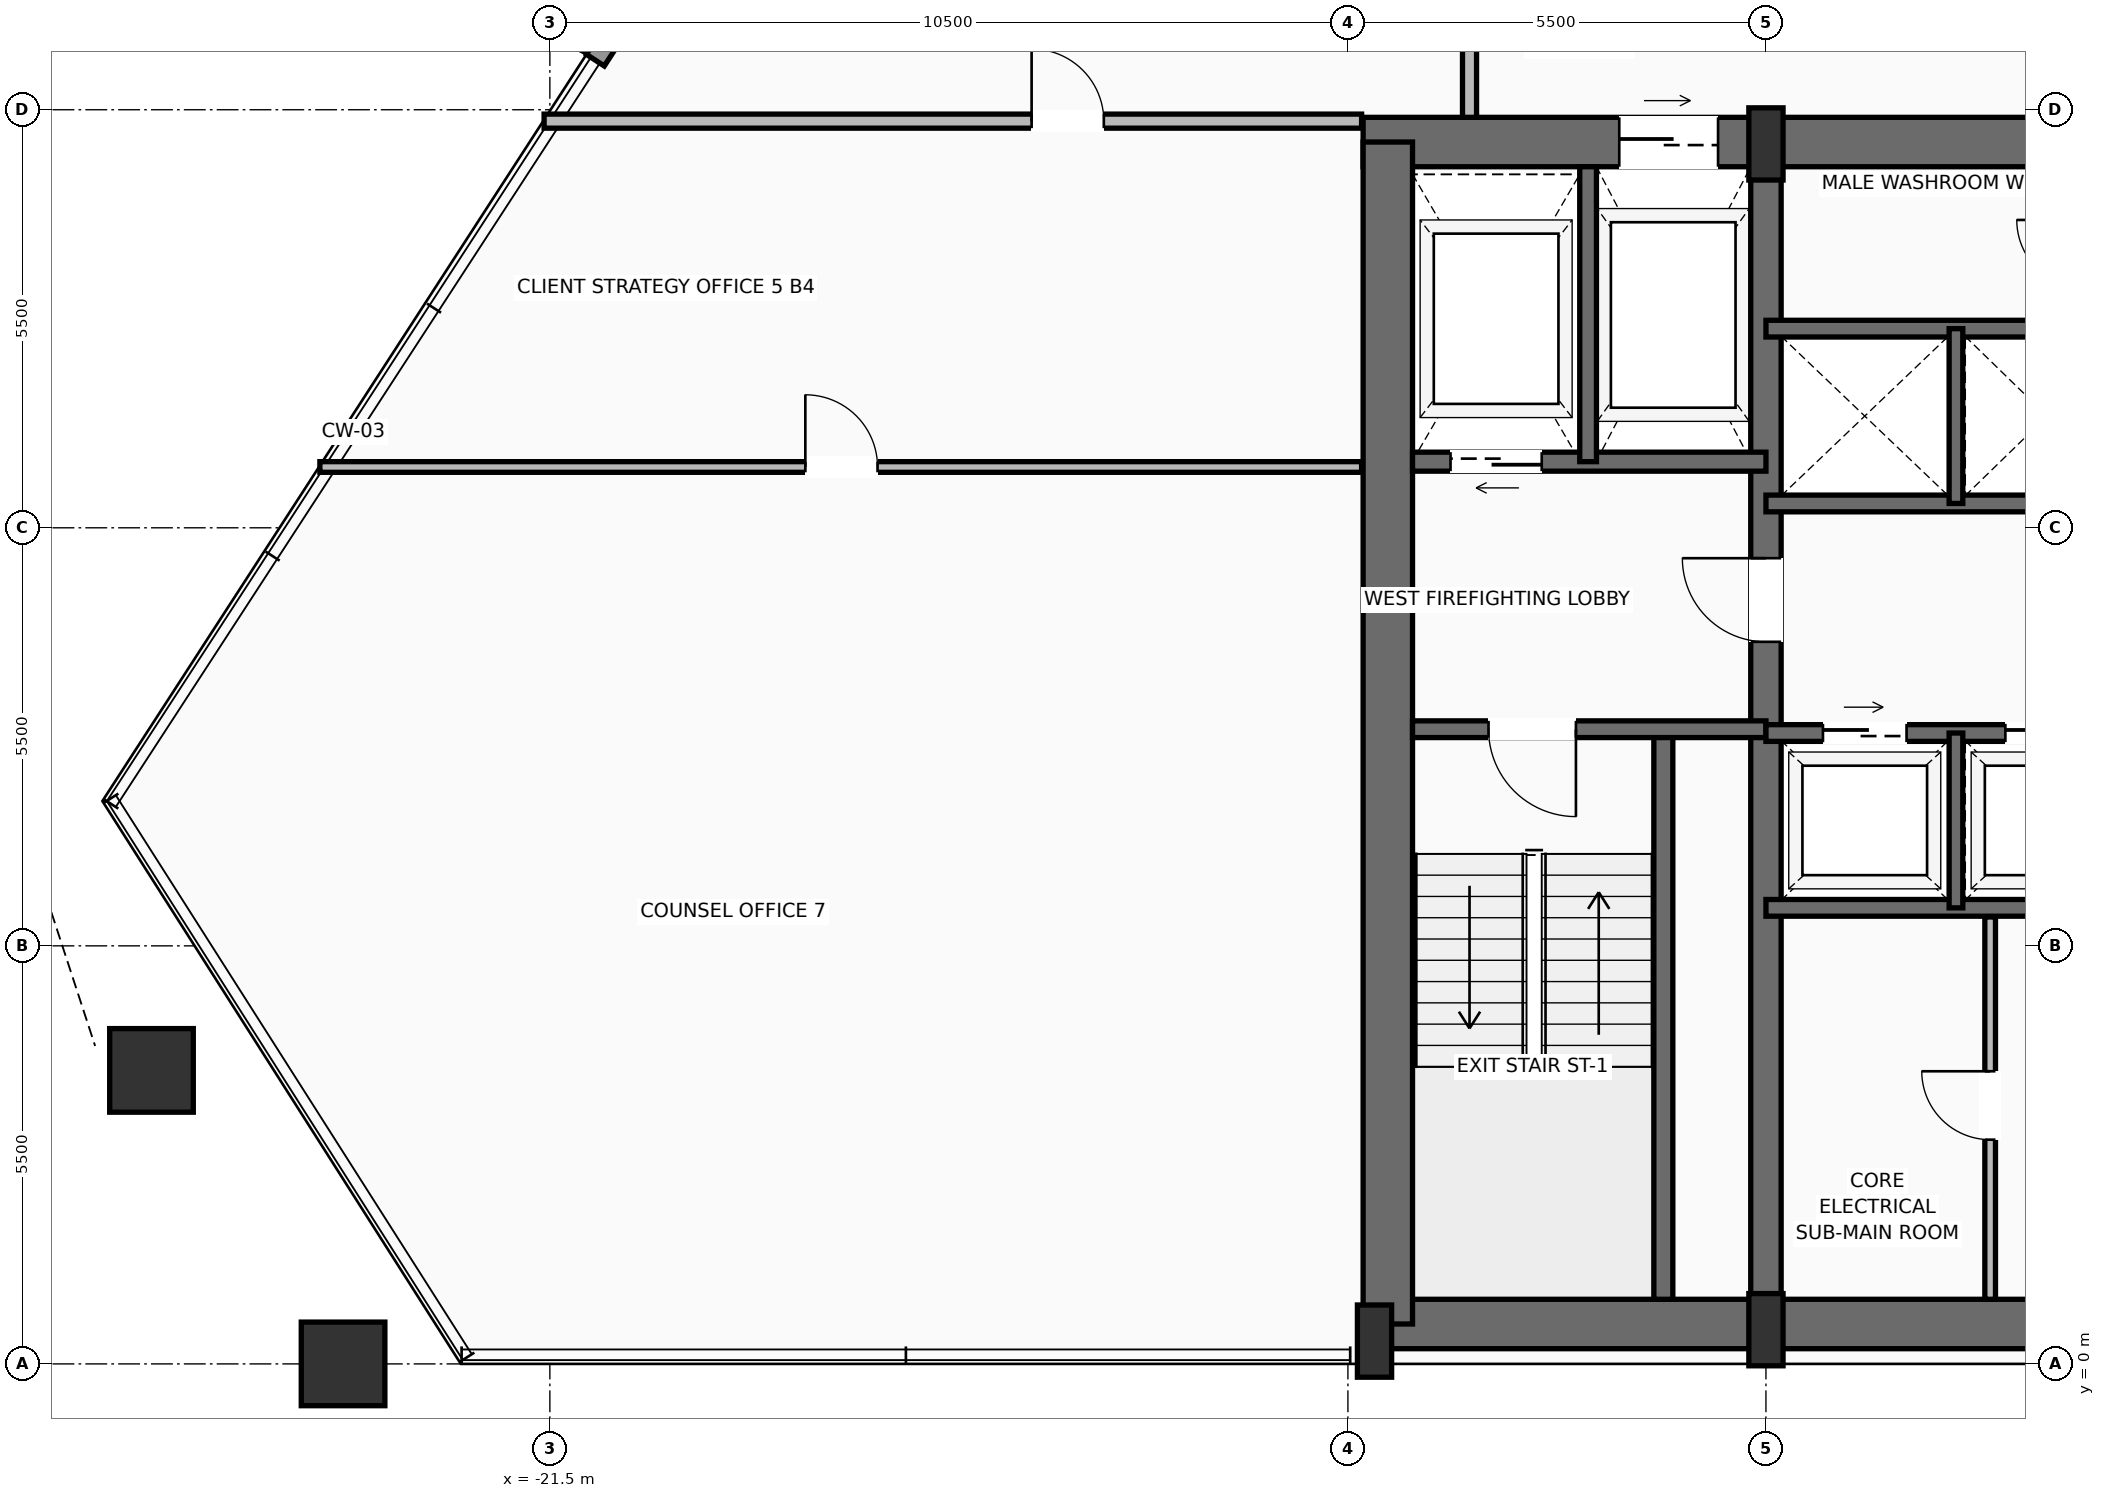
"""IFC4 building model, lengths in metres.
Left out: names, types, materials, properties, quantities, classifications, styles, units other than length and angle.
Written with IfcOpenShell. Run it as: python <this file> out.ifc"""

import sys

from ifc_helpers import new_model, si_unit, direction, frame, frame_2d, origin, origin_2d, place, context, subcontext, project, spatial, rectangle, hollow_rectangle, extrude, source, transform, mapped, element, fill, save


model = new_model("IFC4")
c1 = context("Model", 3, precision=1e-05, world=origin(), true_north=direction((0.0, 1.0)))
c2 = subcontext(c1, "Body", "Model", "MODEL_VIEW")
j1 = project(units=[si_unit("LENGTHUNIT", "METRE"), si_unit("PLANEANGLEUNIT", "RADIAN")], contexts=[c1])
p1 = place(None, origin())
s1 = spatial("IfcSite", under=j1, at=p1, CompositionType="ELEMENT")
p2 = place(p1, origin())
s2 = spatial("IfcBuilding", under=s1, at=p2, CompositionType="ELEMENT")
p3 = place(p2, frame((0.0, 0.0, 144.1)))
s3 = spatial("IfcBuildingStorey", under=s2, at=p3, CompositionType="ELEMENT", Elevation=144.1)
p4 = place(p3, frame((-10.65, 0.525, 0.0), z_axis=(0.0, 0.0, 1.0), x_axis=(1.0, 0.0, 0.0)))
e1 = element("IfcWall", 1, at=p4, inside=s3, PredefinedType="SHEAR", context=c2, shape_type="SweptSolid", body=[
    extrude(rectangle(XDim=21.3, YDim=0.65, at=frame_2d((10.65, 0.0))), origin(), (0.0, 0.0, 1.0), 3.47),
])
p5 = place(p3, frame((-10.8, 16.075, 0.0), z_axis=(0.0, 0.0, 1.0), x_axis=(1.0, 0.0, 0.0)))
e2 = element("IfcWall", 2, at=p5, inside=s3, PredefinedType="SHEAR", context=c2, shape_type="SweptSolid", body=[
    extrude(rectangle(XDim=21.6, YDim=0.65, at=frame_2d((10.8, 0.0))), origin(), (0.0, 0.0, 1.0), 3.47),
])
p6 = place(p5, frame((3.37, 0.0, 0.0)))
e3 = element("IfcOpeningElement", 3, at=p6, cuts=e2, PredefinedType="OPENING", context=c2, shape_type="SweptSolid", body=[
    extrude(rectangle(XDim=1.3, YDim=2.3, at=frame_2d((0.65, 1.15))), frame((0.0, 0.335, 0.0), z_axis=(0.0, -1.0, 0.0), x_axis=(1.0, 0.0, 0.0)), (0.0, 0.0, 1.0), 0.67),
])
p7 = place(p5, frame((9.8, 0.0, 0.0)))
e4 = element("IfcOpeningElement", 4, at=p7, cuts=e2, PredefinedType="OPENING", context=c2, shape_type="SweptSolid", body=[
    extrude(rectangle(XDim=2.0, YDim=2.4, at=frame_2d((1.0, 1.2))), frame((0.0, 0.335, 0.0), z_axis=(0.0, -1.0, 0.0), x_axis=(1.0, 0.0, 0.0)), (0.0, 0.0, 1.0), 0.67),
])
p8 = place(p3, frame((-10.475, 0.525, 0.0), z_axis=(0.0, 0.0, 1.0), x_axis=(0.0, 1.0, 0.0)))
e5 = element("IfcWall", 5, at=p8, inside=s3, PredefinedType="SHEAR", context=c2, shape_type="SweptSolid", body=[
    extrude(rectangle(XDim=15.55, YDim=0.65, at=frame_2d((7.775, 0.0))), origin(), (0.0, 0.0, 1.0), 3.47),
])
p9 = place(p3, frame((-5.5, 0.525, 0.0), z_axis=(0.0, 0.0, 1.0), x_axis=(0.0, 1.0, 0.0)))
e6 = element("IfcWall", 6, at=p9, inside=s3, PredefinedType="SHEAR", context=c2, shape_type="SweptSolid", body=[
    extrude(rectangle(XDim=15.55, YDim=0.4, at=frame_2d((7.775, 0.0))), origin(), (0.0, 0.0, 1.0), 3.47),
])
p10 = place(p9, frame((8.975, 0.0, 0.0)))
e7 = element("IfcOpeningElement", 7, at=p10, cuts=e6, PredefinedType="OPENING", context=c2, shape_type="SweptSolid", body=[
    extrude(rectangle(XDim=1.1, YDim=2.2, at=frame_2d((0.55, 1.1))), frame((0.0, 0.21, 0.0), z_axis=(0.0, -1.0, 0.0), x_axis=(1.0, 0.0, 0.0)), (0.0, 0.0, 1.0), 0.42),
])
m1 = source(origin(), c2, "Body", "SweptSolid", [
    extrude(rectangle(XDim=0.45, YDim=0.95, at=origin_2d()), origin(), (0.0, 0.0, 1.0), 3.7),
])
for number, where, z_axis, x_axis in (
    (8, (-10.65, 0.3, 0.0), (0.0, 0.0, 1.0), (1.0, 0.0, 0.0)),
    (9, (-5.5, 0.45, 0.0), (0.0, 0.0, 1.0), (1.0, 0.0, 0.0)),
    (10, (-5.5, 16.05, 0.0), (0.0, 0.0, 1.0), (1.0, 0.0, 0.0)),
):
    element("IfcColumn", number, at=place(p3, frame(where, z_axis=z_axis, x_axis=x_axis)), inside=s3, PredefinedType="PILASTER", context=c2, shape_type="MappedRepresentation", body=[
        mapped(m1, transform((0.0, 0.0, 0.0), scale=1.0)),
    ])
m2 = source(origin(), c2, "Body", "SweptSolid", [
    extrude(hollow_rectangle(XDim=1.1, YDim=1.1, WallThickness=0.055, at=origin_2d()), origin(), (0.0, 0.0, 1.0), 3.691),
])
p11 = place(p3, frame((-24.221, 0.0, 0.004), z_axis=(-0.010515987048, 0.0, 0.999944705479), x_axis=(0.0, -1.0, 0.0)))
e11 = element("IfcColumn", 11, at=p11, inside=s3, PredefinedType="COLUMN", context=c2, shape_type="MappedRepresentation", body=[
    mapped(m2, transform((0.0, 0.0, 0.0), scale=1.0)),
])
m3 = source(origin(), c2, "Body", "SweptSolid", [
    extrude(hollow_rectangle(XDim=1.1, YDim=1.1, WallThickness=0.055, at=origin_2d()), origin(), (0.0, 0.0, 1.0), 3.692),
])
p12 = place(p3, frame((-26.741, 3.862, 0.004), z_axis=(0.000330666626, -0.016136531338, 0.999869743025), x_axis=(0.999790109099, 0.020487502236, 0.0)))
e12 = element("IfcColumn", 12, at=p12, inside=s3, PredefinedType="COLUMN", context=c2, shape_type="MappedRepresentation", body=[
    mapped(m3, transform((0.0, 0.0, 0.0), scale=1.0)),
])
p13 = place(p3, frame((-20.901, 17.152, 0.0), z_axis=(0.0, 0.0, 1.0), x_axis=(0.544015380352, 0.839075244505, 0.0)))
e13 = element("IfcWall", 13, at=p13, inside=s3, PredefinedType="SOLIDWALL", context=c2, shape_type="SweptSolid", body=[
    extrude(rectangle(XDim=18.396, YDim=0.28, at=frame_2d((9.198, 0.0))), origin(), (0.0, 0.0, 1.0), 3.05),
])
p14 = place(p13, frame((4.415, 0.0, 0.0)))
e14 = element("IfcOpeningElement", 14, at=p14, cuts=e13, PredefinedType="OPENING", context=c2, shape_type="SweptSolid", body=[
    extrude(rectangle(XDim=1.6, YDim=2.35, at=frame_2d((0.8, 1.175))), frame((0.0, 0.15, 0.0), z_axis=(0.0, -1.0, 0.0), x_axis=(1.0, 0.0, 0.0)), (0.0, 0.0, 1.0), 0.3),
])
p15 = place(p13, frame((12.509, 0.0, 0.9)))
e15 = element("IfcOpeningElement", 15, at=p15, cuts=e13, PredefinedType="OPENING", context=c2, shape_type="SweptSolid", body=[
    extrude(rectangle(XDim=2.0, YDim=1.85, at=frame_2d((1.0, 0.925))), frame((0.0, 0.15, 0.0), z_axis=(0.0, -1.0, 0.0), x_axis=(1.0, 0.0, 0.0)), (0.0, 0.0, 1.0), 0.3),
])
p16 = place(p3, frame((-6.85, 0.85, 0.0), z_axis=(0.0, 0.0, 1.0), x_axis=(0.0, 1.0, 0.0)))
e16 = element("IfcWall", 16, at=p16, inside=s3, PredefinedType="SOLIDWALL", context=c2, shape_type="SweptSolid", body=[
    extrude(rectangle(XDim=7.5, YDim=0.25, at=frame_2d((3.75, 0.0))), origin(), (0.0, 0.0, 1.0), 3.47),
])
p17 = place(p3, frame((-5.5, 8.35, 0.0), z_axis=(0.0, 0.0, 1.0), x_axis=(-1.0, 0.0, 0.0)))
e17 = element("IfcWall", 17, at=p17, inside=s3, PredefinedType="SOLIDWALL", context=c2, shape_type="SweptSolid", body=[
    extrude(rectangle(XDim=4.65, YDim=0.22, at=frame_2d((2.325, 0.0))), origin(), (0.0, 0.0, 1.0), 3.47),
])
p18 = place(p17, frame((2.5, 0.0, 0.0)))
e18 = element("IfcOpeningElement", 18, at=p18, cuts=e17, PredefinedType="OPENING", context=c2, shape_type="SweptSolid", body=[
    extrude(rectangle(XDim=1.15, YDim=2.2, at=frame_2d((0.575, 1.1))), frame((0.0, 0.12, 0.0), z_axis=(0.0, -1.0, 0.0), x_axis=(1.0, 0.0, 0.0)), (0.0, 0.0, 1.0), 0.24),
])
p19 = place(p3, frame((-5.5, 11.87, 0.0), z_axis=(0.0, 0.0, 1.0), x_axis=(-1.0, 0.0, 0.0)))
e19 = element("IfcWall", 19, at=p19, inside=s3, PredefinedType="SOLIDWALL", context=c2, shape_type="SweptSolid", body=[
    extrude(rectangle(XDim=4.65, YDim=0.25, at=frame_2d((2.325, 0.0))), origin(), (0.0, 0.0, 1.0), 3.47),
])
p20 = place(p19, frame((2.95, 0.0, 0.0)))
e20 = element("IfcOpeningElement", 20, at=p20, cuts=e19, PredefinedType="OPENING", context=c2, shape_type="SweptSolid", body=[
    extrude(rectangle(XDim=1.2, YDim=2.25, at=frame_2d((0.6, 1.125))), frame((0.0, 0.135, 0.0), z_axis=(0.0, -1.0, 0.0), x_axis=(1.0, 0.0, 0.0)), (0.0, 0.0, 1.0), 0.27),
])
p21 = place(p3, frame((-7.84, 11.87, 0.0), z_axis=(0.0, 0.0, 1.0), x_axis=(0.0, 1.0, 0.0)))
e21 = element("IfcWall", 21, at=p21, inside=s3, PredefinedType="SOLIDWALL", context=c2, shape_type="SweptSolid", body=[
    extrude(rectangle(XDim=3.88, YDim=0.22, at=frame_2d((1.94, 0.0))), origin(), (0.0, 0.0, 1.0), 3.47),
])
p22 = place(p3, frame((-2.55, 0.85, 0.0), z_axis=(0.0, 0.0, 1.0), x_axis=(0.0, 1.0, 0.0)))
e22 = element("IfcWall", 22, at=p22, inside=s3, PredefinedType="PARTITIONING", context=c2, shape_type="SweptSolid", body=[
    extrude(rectangle(XDim=5.03, YDim=0.14, at=frame_2d((2.515, 0.0))), origin(), (0.0, 0.0, 1.0), 3.462),
])
p23 = place(p22, frame((2.1, 0.0, 0.0)))
e23 = element("IfcOpeningElement", 23, at=p23, cuts=e22, PredefinedType="OPENING", context=c2, shape_type="SweptSolid", body=[
    extrude(rectangle(XDim=0.9, YDim=2.1, at=frame_2d((0.45, 1.05))), frame((0.0, 0.08, 0.0), z_axis=(0.0, -1.0, 0.0), x_axis=(1.0, 0.0, 0.0)), (0.0, 0.0, 1.0), 0.16),
])
p24 = place(p3, frame((-5.5, 6.0, 0.0), z_axis=(0.0, 0.0, 1.0), x_axis=(1.0, 0.0, 0.0)))
e24 = element("IfcWall", 24, at=p24, inside=s3, PredefinedType="SOLIDWALL", context=c2, shape_type="SweptSolid", body=[
    extrude(rectangle(XDim=7.32, YDim=0.22, at=frame_2d((3.66, 0.0))), origin(), (0.0, 0.0, 1.0), 3.47),
])
p25 = place(p3, frame((-5.5, 8.3, 0.0), z_axis=(0.0, 0.0, 1.0), x_axis=(1.0, 0.0, 0.0)))
e25 = element("IfcWall", 25, at=p25, inside=s3, PredefinedType="SOLIDWALL", context=c2, shape_type="SweptSolid", body=[
    extrude(rectangle(XDim=7.32, YDim=0.22, at=frame_2d((3.66, 0.0))), origin(), (0.0, 0.0, 1.0), 3.47),
])
p26 = place(p25, frame((0.75, 0.0, 0.0)))
e26 = element("IfcOpeningElement", 26, at=p26, cuts=e25, PredefinedType="OPENING", context=c2, shape_type="SweptSolid", body=[
    extrude(rectangle(XDim=1.1, YDim=2.2, at=frame_2d((0.55, 1.1))), frame((0.0, 0.12, 0.0), z_axis=(0.0, -1.0, 0.0), x_axis=(1.0, 0.0, 0.0)), (0.0, 0.0, 1.0), 0.24),
])
p27 = place(p25, frame((3.15, 0.0, 0.0)))
e27 = element("IfcOpeningElement", 27, at=p27, cuts=e25, PredefinedType="OPENING", context=c2, shape_type="SweptSolid", body=[
    extrude(rectangle(XDim=1.1, YDim=2.2, at=frame_2d((0.55, 1.1))), frame((0.0, 0.12, 0.0), z_axis=(0.0, -1.0, 0.0), x_axis=(1.0, 0.0, 0.0)), (0.0, 0.0, 1.0), 0.24),
])
p28 = place(p25, frame((5.55, 0.0, 0.0)))
e28 = element("IfcOpeningElement", 28, at=p28, cuts=e25, PredefinedType="OPENING", context=c2, shape_type="SweptSolid", body=[
    extrude(rectangle(XDim=1.1, YDim=2.2, at=frame_2d((0.55, 1.1))), frame((0.0, 0.12, 0.0), z_axis=(0.0, -1.0, 0.0), x_axis=(1.0, 0.0, 0.0)), (0.0, 0.0, 1.0), 0.24),
])
p29 = place(p3, frame((-3.0, 6.0, 0.0), z_axis=(0.0, 0.0, 1.0), x_axis=(0.0, 1.0, 0.0)))
e29 = element("IfcWall", 29, at=p29, inside=s3, PredefinedType="SOLIDWALL", context=c2, shape_type="SweptSolid", body=[
    extrude(rectangle(XDim=2.3, YDim=0.18, at=frame_2d((1.15, 0.0))), origin(), (0.0, 0.0, 1.0), 3.47),
])
for number, where, z_axis, x_axis in (
    (30, (-5.5, 11.32, 0.0), (0.0, 0.0, 1.0), (1.0, 0.0, 0.0)),
    (31, (-5.5, 13.62, 0.0), (0.0, 0.0, 1.0), (1.0, 0.0, 0.0)),
):
    element("IfcWall", number, at=place(p3, frame(where, z_axis=z_axis, x_axis=x_axis)), inside=s3, PredefinedType="SOLIDWALL", context=c2, shape_type="SweptSolid", body=[
        extrude(rectangle(XDim=7.32, YDim=0.22, at=frame_2d((3.66, 0.0))), origin(), (0.0, 0.0, 1.0), 3.47),
    ])
p30 = place(p3, frame((-3.0, 11.32, 0.0), z_axis=(0.0, 0.0, 1.0), x_axis=(0.0, 1.0, 0.0)))
e32 = element("IfcWall", 32, at=p30, inside=s3, PredefinedType="SOLIDWALL", context=c2, shape_type="SweptSolid", body=[
    extrude(rectangle(XDim=2.3, YDim=0.18, at=frame_2d((1.15, 0.0))), origin(), (0.0, 0.0, 1.0), 3.47),
])
p31 = place(p3, frame((-9.4, 16.4, 0.0), z_axis=(0.0, 0.0, 1.0), x_axis=(0.0, 1.0, 0.0)))
e33 = element("IfcWall", 33, at=p31, inside=s3, PredefinedType="PARTITIONING", context=c2, shape_type="SweptSolid", body=[
    extrude(rectangle(XDim=7.2, YDim=0.185, at=frame_2d((3.6, 0.0))), origin(), (0.0, 0.0, 1.0), 3.462),
])
p32 = place(p31, frame((2.546, 0.0, 0.0)))
e34 = element("IfcOpeningElement", 34, at=p32, cuts=e33, PredefinedType="OPENING", context=c2, shape_type="SweptSolid", body=[
    extrude(rectangle(XDim=0.95, YDim=2.2, at=frame_2d((0.475, 1.1))), frame((0.0, 0.103, 0.0), z_axis=(0.0, -1.0, 0.0), x_axis=(1.0, 0.0, 0.0)), (0.0, 0.0, 1.0), 0.205),
])
p33 = place(p3, frame((-21.576, 16.35, 0.0), z_axis=(0.0, 0.0, 1.0), x_axis=(1.0, 0.0, 0.0)))
e35 = element("IfcWall", 35, at=p33, inside=s3, PredefinedType="PARTITIONING", context=c2, shape_type="SweptSolid", body=[
    extrude(rectangle(XDim=10.756, YDim=0.185, at=frame_2d((5.378, 0.0))), origin(), (0.0, 0.0, 1.0), 3.462),
])
p34 = place(p33, frame((6.414, 0.0, 0.0)))
e36 = element("IfcOpeningElement", 36, at=p34, cuts=e35, PredefinedType="OPENING", context=c2, shape_type="SweptSolid", body=[
    extrude(rectangle(XDim=0.95, YDim=2.2, at=frame_2d((0.475, 1.1))), frame((0.0, 0.103, 0.0), z_axis=(0.0, -1.0, 0.0), x_axis=(1.0, 0.0, 0.0)), (0.0, 0.0, 1.0), 0.205),
])
p35 = place(p3, frame((-24.526, 11.8, 0.0), z_axis=(0.0, 0.0, 1.0), x_axis=(1.0, 0.0, 0.0)))
e37 = element("IfcWall", 37, at=p35, inside=s3, PredefinedType="PARTITIONING", context=c2, shape_type="SweptSolid", body=[
    extrude(rectangle(XDim=13.706, YDim=0.14, at=frame_2d((6.853, 0.0))), origin(), (0.0, 0.0, 1.0), 3.462),
])
p36 = place(p35, frame((6.387, 0.0, 0.0)))
e38 = element("IfcOpeningElement", 38, at=p36, cuts=e37, PredefinedType="OPENING", context=c2, shape_type="SweptSolid", body=[
    extrude(rectangle(XDim=0.95, YDim=2.2, at=frame_2d((0.475, 1.1))), frame((0.0, 0.08, 0.0), z_axis=(0.0, -1.0, 0.0), x_axis=(1.0, 0.0, 0.0)), (0.0, 0.0, 1.0), 0.16),
])
m4 = source(origin(), c2, "Body", "SweptSolid", [
    extrude(rectangle(XDim=1.15, YDim=2.2, at=frame_2d((0.575, 1.1))), frame((0.0, 0.025, 0.0), z_axis=(0.0, -1.0, 0.0), x_axis=(1.0, 0.0, 0.0)), (0.0, 0.0, 1.0), 0.05),
])
p37 = place(p18, origin())
e39 = element("IfcDoor", 39, at=p37, inside=s3, OperationType="SINGLE_SWING_LEFT", PredefinedType="DOOR", context=c2, shape_type="MappedRepresentation", body=[
    mapped(m4, transform((0.0, 0.0, 0.0), scale=1.0)),
])
fill(e18, e39)
m5 = source(origin(), c2, "Body", "SweptSolid", [
    extrude(rectangle(XDim=1.1, YDim=2.2, at=frame_2d((0.55, 1.1))), frame((0.0, 0.025, 0.0), z_axis=(0.0, -1.0, 0.0), x_axis=(1.0, 0.0, 0.0)), (0.0, 0.0, 1.0), 0.05),
])
p38 = place(p10, origin())
e40 = element("IfcDoor", 40, at=p38, inside=s3, OperationType="SINGLE_SWING_RIGHT", PredefinedType="DOOR", context=c2, shape_type="MappedRepresentation", body=[
    mapped(m5, transform((0.0, 0.0, 0.0), scale=1.0)),
])
fill(e7, e40)
m6 = source(origin(), c2, "Body", "SweptSolid", [
    extrude(rectangle(XDim=1.2, YDim=2.25, at=frame_2d((0.6, 1.125))), frame((0.0, 0.025, 0.0), z_axis=(0.0, -1.0, 0.0), x_axis=(1.0, 0.0, 0.0)), (0.0, 0.0, 1.0), 0.05),
])
p39 = place(p20, origin())
e41 = element("IfcDoor", 41, at=p39, inside=s3, OperationType="SLIDING_TO_LEFT", PredefinedType="DOOR", context=c2, shape_type="MappedRepresentation", body=[
    mapped(m6, transform((0.0, 0.0, 0.0), scale=1.0)),
])
fill(e20, e41)
m7 = source(origin(), c2, "Body", "SweptSolid", [
    extrude(rectangle(XDim=1.3, YDim=2.3, at=frame_2d((0.65, 1.15))), frame((0.0, 0.025, 0.0), z_axis=(0.0, -1.0, 0.0), x_axis=(1.0, 0.0, 0.0)), (0.0, 0.0, 1.0), 0.05),
])
p40 = place(p6, origin())
e42 = element("IfcDoor", 42, at=p40, inside=s3, OperationType="SLIDING_TO_RIGHT", PredefinedType="DOOR", context=c2, shape_type="MappedRepresentation", body=[
    mapped(m7, transform((0.0, 0.0, 0.0), scale=1.0)),
])
fill(e3, e42)
m8 = source(origin(), c2, "Body", "SweptSolid", [
    extrude(rectangle(XDim=0.9, YDim=2.1, at=frame_2d((0.45, 1.05))), frame((0.0, 0.025, 0.0), z_axis=(0.0, -1.0, 0.0), x_axis=(1.0, 0.0, 0.0)), (0.0, 0.0, 1.0), 0.05),
])
p41 = place(p23, origin())
e43 = element("IfcDoor", 43, at=p41, inside=s3, OperationType="SINGLE_SWING_RIGHT", PredefinedType="DOOR", context=c2, shape_type="MappedRepresentation", body=[
    mapped(m8, transform((0.0, 0.0, 0.0), scale=1.0)),
])
fill(e23, e43)
m9 = source(origin(), c2, "Body", "SweptSolid", [
    extrude(rectangle(XDim=1.1, YDim=2.2, at=frame_2d((0.55, 1.1))), frame((0.0, 0.025, 0.0), z_axis=(0.0, -1.0, 0.0), x_axis=(1.0, 0.0, 0.0)), (0.0, 0.0, 1.0), 0.05),
])
p42 = place(p26, origin())
e44 = element("IfcDoor", 44, at=p42, inside=s3, OperationType="SLIDING_TO_LEFT", PredefinedType="DOOR", context=c2, shape_type="MappedRepresentation", body=[
    mapped(m9, transform((0.0, 0.0, 0.0), scale=1.0)),
])
fill(e26, e44)
p43 = place(p27, origin())
e45 = element("IfcDoor", 45, at=p43, inside=s3, OperationType="SLIDING_TO_LEFT", PredefinedType="DOOR", context=c2, shape_type="MappedRepresentation", body=[
    mapped(m9, transform((0.0, 0.0, 0.0), scale=1.0)),
])
fill(e27, e45)
m10 = source(origin(), c2, "Body", "SweptSolid", [
    extrude(rectangle(XDim=0.95, YDim=2.2, at=frame_2d((0.475, 1.1))), frame((0.0, 0.025, 0.0), z_axis=(0.0, -1.0, 0.0), x_axis=(1.0, 0.0, 0.0)), (0.0, 0.0, 1.0), 0.05),
])
p44 = place(p34, origin())
e46 = element("IfcDoor", 46, at=p44, inside=s3, OperationType="SINGLE_SWING_LEFT", PredefinedType="DOOR", context=c2, shape_type="MappedRepresentation", body=[
    mapped(m10, transform((0.0, 0.0, 0.0), scale=1.0)),
])
fill(e36, e46)
p45 = place(p36, origin())
e47 = element("IfcDoor", 47, at=p45, inside=s3, OperationType="SINGLE_SWING_LEFT", PredefinedType="DOOR", context=c2, shape_type="MappedRepresentation", body=[
    mapped(m10, transform((0.0, 0.0, 0.0), scale=1.0)),
])
fill(e38, e47)
save(model, sys.argv[1])
